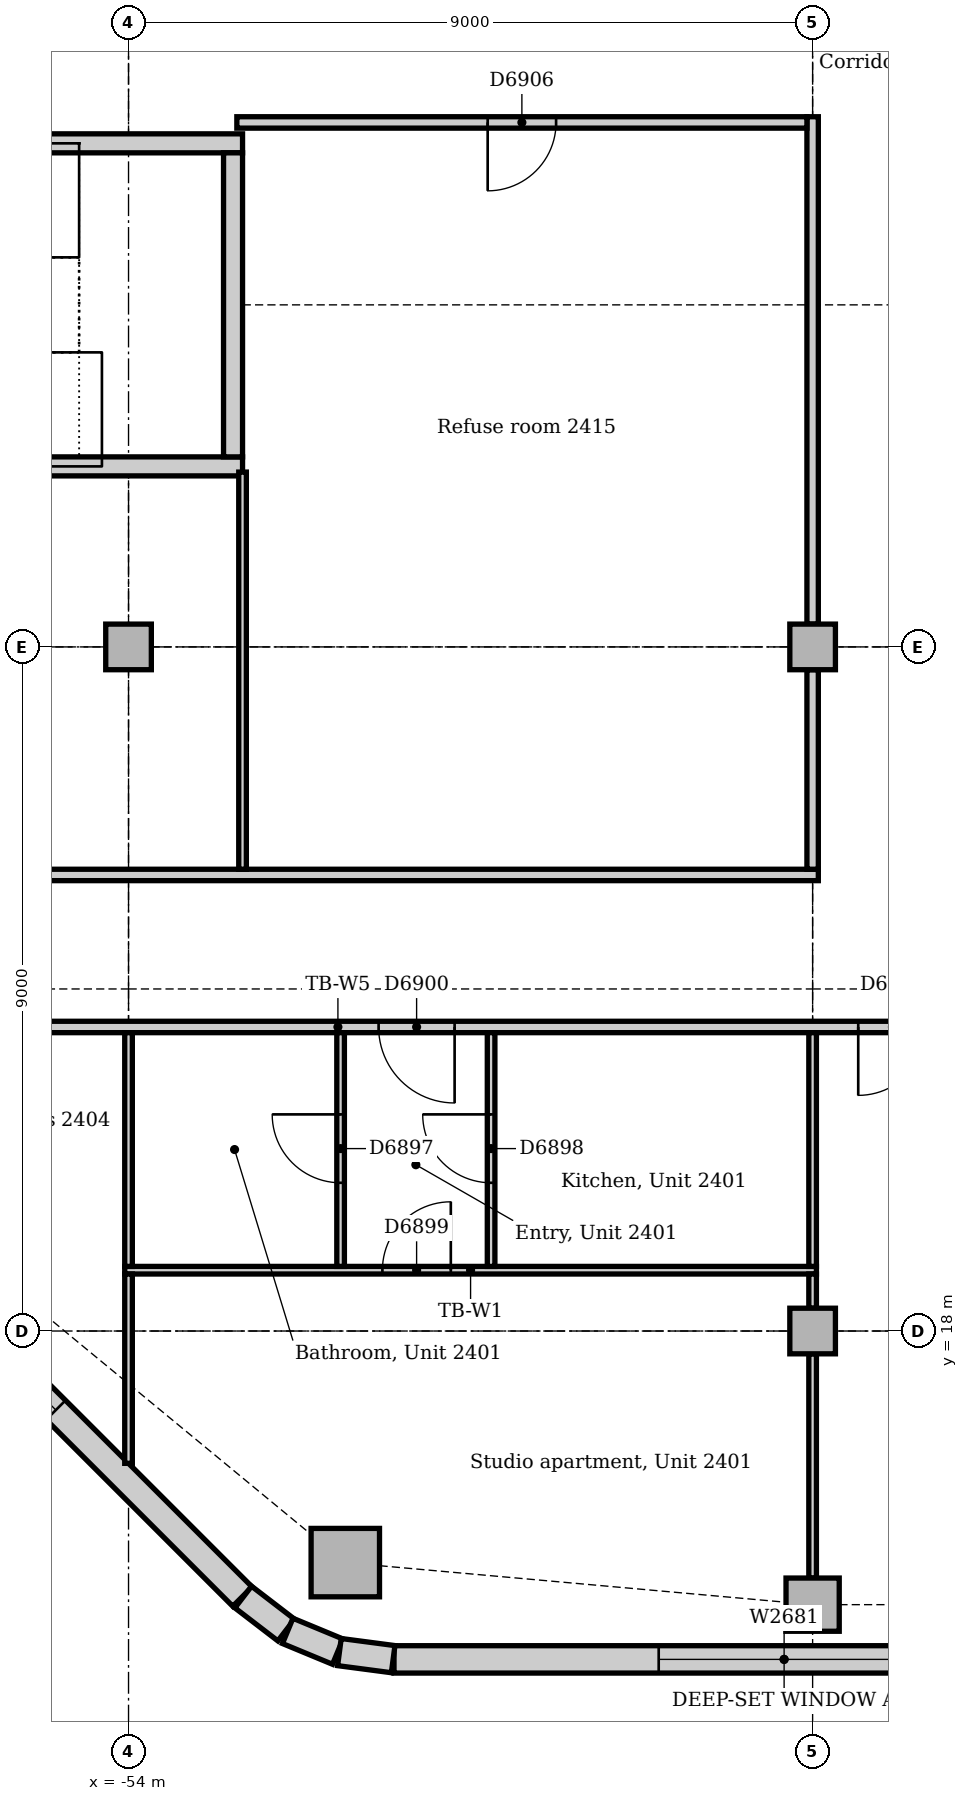
"""IFC4 building model, lengths in metres.
Left out: names, types, materials, properties, quantities, classifications, styles, units other than length and angle.
Written with IfcOpenShell. Run it as: python <this file> out.ifc"""

import sys

from ifc_helpers import new_model, si_unit, direction, frame, frame_2d, origin, origin_2d, place, context, subcontext, project, spatial, rectangle, extrude, element, fill, save


model = new_model("IFC4")
c1 = context("Model", 3, precision=1e-05, world=origin(), true_north=direction((0.0, 1.0)))
c2 = subcontext(c1, "Body", "Model", "MODEL_VIEW")
j1 = project(units=[si_unit("LENGTHUNIT", "METRE"), si_unit("PLANEANGLEUNIT", "RADIAN")], contexts=[c1])
p1 = place(None, origin())
s1 = spatial("IfcSite", under=j1, at=p1, CompositionType="ELEMENT")
p2 = place(p1, origin())
s2 = spatial("IfcBuilding", under=s1, at=p2, CompositionType="ELEMENT")
p3 = place(p2, frame((0.0, 0.0, 104.0)))
s3 = spatial("IfcBuildingStorey", under=s2, at=p3, CompositionType="ELEMENT", Elevation=104.0)
p4 = place(p3, frame((-60.0, 29.375, 0.0), z_axis=(0.0, 0.0, 1.0), x_axis=(1.0, 0.0, 0.0)))
e1 = element("IfcWall", 1, at=p4, inside=s3, PredefinedType="SOLIDWALL", context=c2, shape_type="SweptSolid", body=[
    extrude(rectangle(XDim=7.5, YDim=0.25, at=frame_2d((3.75, 0.0))), origin(), (0.0, 0.0, 1.0), 4.0),
])
p5 = place(p3, frame((-52.5, 33.625, 0.0), z_axis=(0.0, 0.0, 1.0), x_axis=(-1.0, 0.0, 0.0)))
e2 = element("IfcWall", 2, at=p5, inside=s3, PredefinedType="SOLIDWALL", context=c2, shape_type="SweptSolid", body=[
    extrude(rectangle(XDim=7.5, YDim=0.25, at=frame_2d((3.75, 0.0))), origin(), (0.0, 0.0, 1.0), 4.0),
])
p6 = place(p5, frame((6.0, 0.0, 0.0)))
e3 = element("IfcOpeningElement", 3, at=p6, cuts=e2, PredefinedType="OPENING", context=c2, shape_type="SweptSolid", body=[
    extrude(rectangle(XDim=1.0, YDim=2.1, at=frame_2d((0.5, 1.05))), frame((0.0, 0.135, 0.0), z_axis=(0.0, -1.0, 0.0), x_axis=(1.0, 0.0, 0.0)), (0.0, 0.0, 1.0), 0.27),
])
p7 = place(p3, frame((-52.625, 29.5, 0.0), z_axis=(0.0, 0.0, 1.0), x_axis=(0.0, 1.0, 0.0)))
e4 = element("IfcWall", 4, at=p7, inside=s3, PredefinedType="SOLIDWALL", context=c2, shape_type="SweptSolid", body=[
    extrude(rectangle(XDim=4.0, YDim=0.25, at=frame_2d((2.0, 0.0))), origin(), (0.0, 0.0, 1.0), 4.0),
])
p8 = place(p3, frame((-51.148, 14.953, 0.0), z_axis=(0.0, 0.0, 1.0), x_axis=(1.0, 0.0, 0.0)))
e5 = element("IfcColumn", 5, at=p8, inside=s3, PredefinedType="COLUMN", context=c2, shape_type="SweptSolid", body=[
    extrude(rectangle(XDim=0.9, YDim=0.9, at=origin_2d()), origin(), (0.0, 0.0, 1.0), 3.85),
])
p9 = place(p3, frame((-45.0, 14.4, 0.0), z_axis=(0.0, 0.0, 1.0), x_axis=(1.0, 0.0, 0.0)))
e6 = element("IfcColumn", 6, at=p9, inside=s3, PredefinedType="COLUMN", context=c2, shape_type="SweptSolid", body=[
    extrude(rectangle(XDim=0.7, YDim=0.7, at=origin_2d()), origin(), (0.0, 0.0, 1.0), 3.85),
])
for number, where, z_axis, x_axis in (
    (7, (-54.0, 27.0, 0.0), (0.0, 0.0, 1.0), (1.0, 0.0, 0.0)),
    (8, (-45.0, 18.0, 0.0), (0.0, 0.0, 1.0), (1.0, 0.0, 0.0)),
    (9, (-45.0, 27.0, 0.0), (0.0, 0.0, 1.0), (1.0, 0.0, 0.0)),
):
    element("IfcColumn", number, at=place(p3, frame(where, z_axis=z_axis, x_axis=x_axis)), inside=s3, PredefinedType="COLUMN", context=c2, shape_type="SweptSolid", body=[
        extrude(rectangle(XDim=0.6, YDim=0.6, at=origin_2d()), origin(), (0.0, 0.0, 1.0), 3.85),
    ])
p10 = place(p3, frame((-50.507, 13.68, 0.0), z_axis=(0.0, 0.0, 1.0), x_axis=(1.0, 0.0, 0.0)))
e10 = element("IfcWall", 10, at=p10, inside=s3, PredefinedType="STANDARD", context=c2, shape_type="SweptSolid", body=[
    extrude(rectangle(XDim=19.265, YDim=0.36, at=frame_2d((9.632, 0.0))), origin(), (0.0, 0.0, 1.0), 3.85),
])
p11 = place(p10, frame((3.482, 0.0, 0.9)))
e11 = element("IfcOpeningElement", 11, at=p11, cuts=e10, PredefinedType="OPENING", context=c2, shape_type="SweptSolid", body=[
    extrude(rectangle(XDim=3.3, YDim=1.6, at=frame_2d((1.65, 0.8))), frame((0.0, 0.19, 0.0), z_axis=(0.0, -1.0, 0.0), x_axis=(1.0, 0.0, 0.0)), (0.0, 0.0, 1.0), 0.38),
])
p12 = place(p10, frame((7.982, 0.0, 0.9)))
e12 = element("IfcOpeningElement", 12, at=p12, cuts=e10, PredefinedType="OPENING", context=c2, shape_type="SweptSolid", body=[
    extrude(rectangle(XDim=3.3, YDim=1.6, at=frame_2d((1.65, 0.8))), frame((0.0, 0.19, 0.0), z_axis=(0.0, -1.0, 0.0), x_axis=(1.0, 0.0, 0.0)), (0.0, 0.0, 1.0), 0.38),
])
p13 = place(p10, frame((12.482, 0.0, 0.9)))
e13 = element("IfcOpeningElement", 13, at=p13, cuts=e10, PredefinedType="OPENING", context=c2, shape_type="SweptSolid", body=[
    extrude(rectangle(XDim=3.3, YDim=1.6, at=frame_2d((1.65, 0.8))), frame((0.0, 0.19, 0.0), z_axis=(0.0, -1.0, 0.0), x_axis=(1.0, 0.0, 0.0)), (0.0, 0.0, 1.0), 0.38),
])
p14 = place(p3, frame((-59.744, 21.749, 0.0), z_axis=(0.0, 0.0, 1.0), x_axis=(0.707106781187, -0.707106781187, 0.0)))
e14 = element("IfcWall", 14, at=p14, inside=s3, PredefinedType="STANDARD", context=c2, shape_type="SweptSolid", body=[
    extrude(rectangle(XDim=10.243, YDim=0.36, at=frame_2d((5.121, 0.0))), origin(), (0.0, 0.0, 1.0), 3.85),
])
p15 = place(p14, frame((3.471, 0.0, 0.9)))
e15 = element("IfcOpeningElement", 15, at=p15, cuts=e14, PredefinedType="OPENING", context=c2, shape_type="SweptSolid", body=[
    extrude(rectangle(XDim=3.3, YDim=1.6, at=frame_2d((1.65, 0.8))), frame((0.0, 0.19, 0.0), z_axis=(0.0, -1.0, 0.0), x_axis=(1.0, 0.0, 0.0)), (0.0, 0.0, 1.0), 0.38),
])
p16 = place(p3, frame((-52.491, 14.5, 0.0), z_axis=(0.0, 0.0, 1.0), x_axis=(0.793321924995, -0.608802368033, 0.0)))
e16 = element("IfcWall", 16, at=p16, inside=s3, PredefinedType="STANDARD", context=c2, shape_type="SweptSolid", body=[
    extrude(rectangle(XDim=0.713, YDim=0.36, at=frame_2d((0.357, 0.0))), origin(), (0.0, 0.0, 1.0), 3.85),
])
for number, where, z_axis, x_axis in (
    (17, (-51.906, 14.055, 0.0), (0.0, 0.0, 1.0), (0.924, -0.383, 0.0)),
    (18, (-51.226, 13.776, 0.0), (0.0, 0.0, 1.0), (0.991, -0.131, 0.0)),
):
    element("IfcWall", number, at=place(p3, frame(where, z_axis=z_axis, x_axis=x_axis)), inside=s3, PredefinedType="STANDARD", context=c2, shape_type="SweptSolid", body=[
        extrude(rectangle(XDim=0.713, YDim=0.36, at=frame_2d((0.356, 0.0))), origin(), (0.0, 0.0, 1.0), 3.85),
    ])
p17 = place(p3, frame((-59.766, 22.0, 0.0), z_axis=(0.0, 0.0, 1.0), x_axis=(1.0, 0.0, 0.0)))
e19 = element("IfcWall", 19, at=p17, inside=s3, PredefinedType="PARTITIONING", context=c2, shape_type="SweptSolid", body=[
    extrude(rectangle(XDim=17.041, YDim=0.15, at=frame_2d((8.52, 0.0))), origin(), (0.0, 0.0, 1.0), 3.85),
])
p18 = place(p17, frame((15.366, 0.0, 0.0)))
e20 = element("IfcOpeningElement", 20, at=p18, cuts=e19, PredefinedType="OPENING", context=c2, shape_type="SweptSolid", body=[
    extrude(rectangle(XDim=0.9, YDim=2.1, at=frame_2d((0.45, 1.05))), frame((0.0, 0.085, 0.0), z_axis=(0.0, -1.0, 0.0), x_axis=(1.0, 0.0, 0.0)), (0.0, 0.0, 1.0), 0.17),
])
p19 = place(p17, frame((2.5, 0.0, 0.0)))
e21 = element("IfcOpeningElement", 21, at=p19, cuts=e19, PredefinedType="OPENING", context=c2, shape_type="SweptSolid", body=[
    extrude(rectangle(XDim=0.9, YDim=2.1, at=frame_2d((0.45, 1.05))), frame((0.0, 0.085, 0.0), z_axis=(0.0, -1.0, 0.0), x_axis=(1.0, 0.0, 0.0)), (0.0, 0.0, 1.0), 0.17),
])
p20 = place(p17, frame((9.056, 0.0, 0.0)))
e22 = element("IfcOpeningElement", 22, at=p20, cuts=e19, PredefinedType="OPENING", context=c2, shape_type="SweptSolid", body=[
    extrude(rectangle(XDim=1.0, YDim=2.1, at=frame_2d((0.5, 1.05))), frame((0.0, 0.085, 0.0), z_axis=(0.0, -1.0, 0.0), x_axis=(1.0, 0.0, 0.0)), (0.0, 0.0, 1.0), 0.17),
])
p21 = place(p3, frame((-60.075, 24.0, 0.0), z_axis=(0.0, 0.0, 1.0), x_axis=(1.0, 0.0, 0.0)))
e23 = element("IfcWall", 23, at=p21, inside=s3, PredefinedType="PARTITIONING", context=c2, shape_type="SweptSolid", body=[
    extrude(rectangle(XDim=15.15, YDim=0.15, at=frame_2d((7.575, 0.0))), origin(), (0.0, 0.0, 1.0), 3.85),
])
p22 = place(p21, frame((3.4, 0.0, 0.0)))
e24 = element("IfcOpeningElement", 24, at=p22, cuts=e23, PredefinedType="OPENING", context=c2, shape_type="SweptSolid", body=[
    extrude(rectangle(XDim=0.9, YDim=2.1, at=frame_2d((0.45, 1.05))), frame((0.0, 0.085, 0.0), z_axis=(0.0, -1.0, 0.0), x_axis=(1.0, 0.0, 0.0)), (0.0, 0.0, 1.0), 0.17),
])
p23 = place(p3, frame((-45.0, 24.075, 0.0), z_axis=(0.0, 0.0, 1.0), x_axis=(0.0, 1.0, 0.0)))
e25 = element("IfcWall", 25, at=p23, inside=s3, PredefinedType="PARTITIONING", context=c2, shape_type="SweptSolid", body=[
    extrude(rectangle(XDim=2.625, YDim=0.15, at=frame_2d((1.312, 0.0))), origin(), (0.0, 0.0, 1.0), 3.362),
])
p24 = place(p3, frame((-45.0, 27.3, 0.0), z_axis=(0.0, 0.0, 1.0), x_axis=(0.0, 1.0, 0.0)))
e26 = element("IfcWall", 26, at=p24, inside=s3, PredefinedType="PARTITIONING", context=c2, shape_type="SweptSolid", body=[
    extrude(rectangle(XDim=6.675, YDim=0.15, at=frame_2d((3.337, 0.0))), origin(), (0.0, 0.0, 1.0), 3.362),
])
p25 = place(p3, frame((-52.575, 33.9, 0.0), z_axis=(0.0, 0.0, 1.0), x_axis=(1.0, 0.0, 0.0)))
e27 = element("IfcWall", 27, at=p25, inside=s3, PredefinedType="PARTITIONING", context=c2, shape_type="SweptSolid", body=[
    extrude(rectangle(XDim=7.5, YDim=0.15, at=frame_2d((3.75, 0.0))), origin(), (0.0, 0.0, 1.0), 3.85),
])
p26 = place(p25, frame((3.3, 0.0, 0.0)))
e28 = element("IfcOpeningElement", 28, at=p26, cuts=e27, PredefinedType="OPENING", context=c2, shape_type="SweptSolid", body=[
    extrude(rectangle(XDim=0.9, YDim=2.1, at=frame_2d((0.45, 1.05))), frame((0.0, 0.085, 0.0), z_axis=(0.0, -1.0, 0.0), x_axis=(1.0, 0.0, 0.0)), (0.0, 0.0, 1.0), 0.17),
])
p27 = place(p3, frame((-54.05, 18.8, 0.0), z_axis=(0.0, 0.0, 1.0), x_axis=(1.0, 0.0, 0.0)))
e29 = element("IfcWall", 29, at=p27, inside=s3, PredefinedType="PARTITIONING", context=c2, shape_type="SweptSolid", body=[
    extrude(rectangle(XDim=9.1, YDim=0.1, at=frame_2d((4.55, 0.0))), origin(), (0.0, 0.0, 1.0), 3.85),
])
p28 = place(p27, frame((3.39, 0.0, 0.0)))
e30 = element("IfcOpeningElement", 30, at=p28, cuts=e29, PredefinedType="OPENING", context=c2, shape_type="SweptSolid", body=[
    extrude(rectangle(XDim=0.9, YDim=2.1, at=frame_2d((0.45, 1.05))), frame((0.0, 0.06, 0.0), z_axis=(0.0, -1.0, 0.0), x_axis=(1.0, 0.0, 0.0)), (0.0, 0.0, 1.0), 0.12),
])
p29 = place(p3, frame((-45.0, 18.85, 0.0), z_axis=(0.0, 0.0, 1.0), x_axis=(0.0, 1.0, 0.0)))
e31 = element("IfcWall", 31, at=p29, inside=s3, PredefinedType="PARTITIONING", context=c2, shape_type="SweptSolid", body=[
    extrude(rectangle(XDim=3.075, YDim=0.1, at=frame_2d((1.538, 0.0))), origin(), (0.0, 0.0, 1.0), 3.362),
])
p30 = place(p3, frame((-45.0, 18.3, 0.0), z_axis=(0.0, 0.0, 1.0), x_axis=(0.0, 1.0, 0.0)))
e32 = element("IfcWall", 32, at=p30, inside=s3, PredefinedType="PARTITIONING", context=c2, shape_type="SweptSolid", body=[
    extrude(rectangle(XDim=0.45, YDim=0.1, at=frame_2d((0.225, 0.0))), origin(), (0.0, 0.0, 1.0), 3.85),
])
p31 = place(p3, frame((-45.0, 14.75, 0.0), z_axis=(0.0, 0.0, 1.0), x_axis=(0.0, 1.0, 0.0)))
e33 = element("IfcWall", 33, at=p31, inside=s3, PredefinedType="PARTITIONING", context=c2, shape_type="SweptSolid", body=[
    extrude(rectangle(XDim=2.95, YDim=0.1, at=frame_2d((1.475, 0.0))), origin(), (0.0, 0.0, 1.0), 3.652),
])
p32 = place(p3, frame((-54.0, 18.85, 0.0), z_axis=(0.0, 0.0, 1.0), x_axis=(0.0, 1.0, 0.0)))
e34 = element("IfcWall", 34, at=p32, inside=s3, PredefinedType="PARTITIONING", context=c2, shape_type="SweptSolid", body=[
    extrude(rectangle(XDim=3.075, YDim=0.1, at=frame_2d((1.538, 0.0))), origin(), (0.0, 0.0, 1.0), 3.362),
])
p33 = place(p3, frame((-54.0, 16.259, 0.0), z_axis=(0.0, 0.0, 1.0), x_axis=(0.0, 1.0, 0.0)))
e35 = element("IfcWall", 35, at=p33, inside=s3, PredefinedType="PARTITIONING", context=c2, shape_type="SweptSolid", body=[
    extrude(rectangle(XDim=2.491, YDim=0.1, at=frame_2d((1.245, 0.0))), origin(), (0.0, 0.0, 1.0), 3.362),
])
p34 = place(p3, frame((-52.5, 24.075, 0.0), z_axis=(0.0, 0.0, 1.0), x_axis=(0.0, 1.0, 0.0)))
e36 = element("IfcWall", 36, at=p34, inside=s3, PredefinedType="PARTITIONING", context=c2, shape_type="SweptSolid", body=[
    extrude(rectangle(XDim=5.225, YDim=0.1, at=frame_2d((2.612, 0.0))), origin(), (0.0, 0.0, 1.0), 3.85),
])
p35 = place(p3, frame((-51.21, 18.85, 0.0), z_axis=(0.0, 0.0, 1.0), x_axis=(0.0, 1.0, 0.0)))
e37 = element("IfcWall", 37, at=p35, inside=s3, PredefinedType="PARTITIONING", context=c2, shape_type="SweptSolid", body=[
    extrude(rectangle(XDim=3.075, YDim=0.1, at=frame_2d((1.538, 0.0))), origin(), (0.0, 0.0, 1.0), 3.85),
])
p36 = place(p35, frame((1.1, 0.0, 0.0)))
e38 = element("IfcOpeningElement", 38, at=p36, cuts=e37, PredefinedType="OPENING", context=c2, shape_type="SweptSolid", body=[
    extrude(rectangle(XDim=0.9, YDim=2.1, at=frame_2d((0.45, 1.05))), frame((0.0, 0.06, 0.0), z_axis=(0.0, -1.0, 0.0), x_axis=(1.0, 0.0, 0.0)), (0.0, 0.0, 1.0), 0.12),
])
p37 = place(p3, frame((-49.23, 18.85, 0.0), z_axis=(0.0, 0.0, 1.0), x_axis=(0.0, 1.0, 0.0)))
e39 = element("IfcWall", 39, at=p37, inside=s3, PredefinedType="PARTITIONING", context=c2, shape_type="SweptSolid", body=[
    extrude(rectangle(XDim=3.075, YDim=0.1, at=frame_2d((1.538, 0.0))), origin(), (0.0, 0.0, 1.0), 3.85),
])
p38 = place(p37, frame((1.1, 0.0, 0.0)))
e40 = element("IfcOpeningElement", 40, at=p38, cuts=e39, PredefinedType="OPENING", context=c2, shape_type="SweptSolid", body=[
    extrude(rectangle(XDim=0.9, YDim=2.1, at=frame_2d((0.45, 1.05))), frame((0.0, 0.06, 0.0), z_axis=(0.0, -1.0, 0.0), x_axis=(1.0, 0.0, 0.0)), (0.0, 0.0, 1.0), 0.12),
])
p39 = place(p11, origin())
e41 = element("IfcWindow", 41, at=p39, inside=s3, PartitioningType="SINGLE_PANEL", PredefinedType="WINDOW", context=c2, shape_type="SweptSolid", body=[
    extrude(rectangle(XDim=3.3, YDim=1.6, at=frame_2d((1.65, 0.8))), frame((0.0, 0.13, 0.0), z_axis=(0.0, -1.0, 0.0), x_axis=(1.0, 0.0, 0.0)), (0.0, 0.0, 1.0), 0.06),
])
fill(e11, e41)
p40 = place(p15, origin())
e42 = element("IfcWindow", 42, at=p40, inside=s3, PartitioningType="SINGLE_PANEL", PredefinedType="WINDOW", context=c2, shape_type="SweptSolid", body=[
    extrude(rectangle(XDim=3.3, YDim=1.6, at=frame_2d((1.65, 0.8))), frame((0.0, 0.13, 0.0), z_axis=(0.0, -1.0, 0.0), x_axis=(1.0, 0.0, 0.0)), (0.0, 0.0, 1.0), 0.06),
])
fill(e15, e42)
p41 = place(p18, frame((0.9, 0.0, 0.0), z_axis=(0.0, 0.0, 1.0), x_axis=(-1.0, 0.0, 0.0)))
e43 = element("IfcDoor", 43, at=p41, inside=s3, OperationType="SINGLE_SWING_RIGHT", PredefinedType="DOOR", context=c2, shape_type="SweptSolid", body=[
    extrude(rectangle(XDim=0.9, YDim=2.1, at=frame_2d((0.45, 1.05))), frame((0.0, 0.025, 0.0), z_axis=(0.0, -1.0, 0.0), x_axis=(1.0, 0.0, 0.0)), (0.0, 0.0, 1.0), 0.05),
])
fill(e20, e43)
p42 = place(p36, origin())
e44 = element("IfcDoor", 44, at=p42, inside=s3, OperationType="SINGLE_SWING_RIGHT", PredefinedType="DOOR", context=c2, shape_type="SweptSolid", body=[
    extrude(rectangle(XDim=0.9, YDim=2.1, at=frame_2d((0.45, 1.05))), frame((0.0, 0.025, 0.0), z_axis=(0.0, -1.0, 0.0), x_axis=(1.0, 0.0, 0.0)), (0.0, 0.0, 1.0), 0.05),
])
fill(e38, e44)
p43 = place(p38, origin())
e45 = element("IfcDoor", 45, at=p43, inside=s3, OperationType="SINGLE_SWING_RIGHT", PredefinedType="DOOR", context=c2, shape_type="SweptSolid", body=[
    extrude(rectangle(XDim=0.9, YDim=2.1, at=frame_2d((0.45, 1.05))), frame((0.0, 0.025, 0.0), z_axis=(0.0, -1.0, 0.0), x_axis=(1.0, 0.0, 0.0)), (0.0, 0.0, 1.0), 0.05),
])
fill(e40, e45)
p44 = place(p28, origin())
e46 = element("IfcDoor", 46, at=p44, inside=s3, OperationType="SINGLE_SWING_RIGHT", PredefinedType="DOOR", context=c2, shape_type="SweptSolid", body=[
    extrude(rectangle(XDim=0.9, YDim=2.1, at=frame_2d((0.45, 1.05))), frame((0.0, 0.025, 0.0), z_axis=(0.0, -1.0, 0.0), x_axis=(1.0, 0.0, 0.0)), (0.0, 0.0, 1.0), 0.05),
])
fill(e30, e46)
p45 = place(p20, frame((1.0, 0.0, 0.0), z_axis=(0.0, 0.0, 1.0), x_axis=(-1.0, 0.0, 0.0)))
e47 = element("IfcDoor", 47, at=p45, inside=s3, OperationType="SINGLE_SWING_LEFT", PredefinedType="DOOR", context=c2, shape_type="SweptSolid", body=[
    extrude(rectangle(XDim=1.0, YDim=2.1, at=frame_2d((0.5, 1.05))), frame((0.0, 0.025, 0.0), z_axis=(0.0, -1.0, 0.0), x_axis=(1.0, 0.0, 0.0)), (0.0, 0.0, 1.0), 0.05),
])
fill(e22, e47)
p46 = place(p26, frame((0.9, 0.0, 0.0), z_axis=(0.0, 0.0, 1.0), x_axis=(-1.0, 0.0, 0.0)))
e48 = element("IfcDoor", 48, at=p46, inside=s3, OperationType="SINGLE_SWING_RIGHT", PredefinedType="DOOR", context=c2, shape_type="SweptSolid", body=[
    extrude(rectangle(XDim=0.9, YDim=2.1, at=frame_2d((0.45, 1.05))), frame((0.0, 0.025, 0.0), z_axis=(0.0, -1.0, 0.0), x_axis=(1.0, 0.0, 0.0)), (0.0, 0.0, 1.0), 0.05),
])
fill(e28, e48)
save(model, sys.argv[1])
